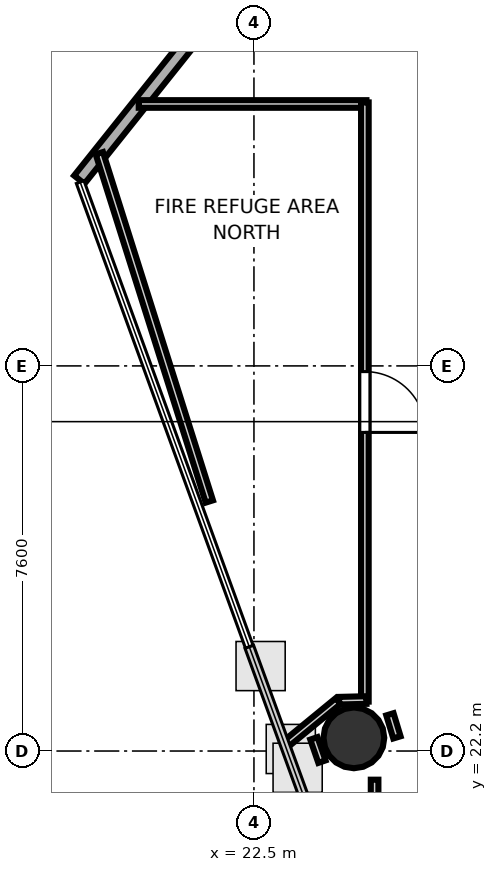
"""IFC4 building model, lengths in metres.
Left out: names, types, materials, properties, quantities, classifications, styles, units other than length and angle.
Written with IfcOpenShell. Run it as: python <this file> out.ifc"""

import sys

from ifc_helpers import new_model, si_unit, direction, frame, frame_2d, origin, origin_2d, place, context, subcontext, project, spatial, rectangle, hollow_circle, extrude, element, fill, save


model = new_model("IFC4")
c1 = context("Model", 3, precision=1e-05, world=origin(), true_north=direction((0.0, 1.0)))
c2 = subcontext(c1, "Body", "Model", "MODEL_VIEW")
j1 = project(units=[si_unit("LENGTHUNIT", "METRE"), si_unit("PLANEANGLEUNIT", "RADIAN")], contexts=[c1])
p1 = place(None, origin())
s1 = spatial("IfcSite", under=j1, at=p1, CompositionType="ELEMENT")
p2 = place(p1, origin())
s2 = spatial("IfcBuilding", under=s1, at=p2, CompositionType="ELEMENT")
p3 = place(p2, frame((0.0, 0.0, 229.9)))
s3 = spatial("IfcBuildingStorey", under=s2, at=p3, CompositionType="ELEMENT", Elevation=229.9)
p4 = place(p3, frame((24.472, 22.46, 0.0), z_axis=(0.0, 0.0, 1.0), x_axis=(1.0, 0.0, 0.0)))
e1 = element("IfcColumn", 1, at=p4, inside=s3, PredefinedType="COLUMN", context=c2, shape_type="SweptSolid", body=[
    extrude(hollow_circle(Radius=0.6, WallThickness=0.03, at=origin_2d()), origin(), (0.0, 0.0, 1.0), 4.6),
])
p5 = place(p3, frame((23.127, 38.576, 0.0), z_axis=(0.0, 0.0, 1.0), x_axis=(-0.624042741738, -0.781390207568, 0.0)))
e2 = element("IfcWall", 2, at=p5, inside=s3, PredefinedType="SOLIDWALL", context=c2, shape_type="SweptSolid", body=[
    extrude(rectangle(XDim=6.529, YDim=0.26, at=frame_2d((3.265, 0.0))), origin(), (0.0, 0.0, 1.0), 4.38),
])
p6 = place(p5, frame((1.259, 0.0, 1.0)))
e3 = element("IfcOpeningElement", 3, at=p6, cuts=e2, PredefinedType="OPENING", context=c2, shape_type="SweptSolid", body=[
    extrude(rectangle(XDim=1.4, YDim=1.5, at=frame_2d((0.7, 0.75))), frame((0.0, 0.14, 0.0), z_axis=(0.0, -1.0, 0.0), x_axis=(1.0, 0.0, 0.0)), (0.0, 0.0, 1.0), 0.28),
])
p7 = place(p3, frame((20.226, 34.969, 0.0), z_axis=(0.0, 0.0, 1.0), x_axis=(1.0, 0.0, 0.0)))
e4 = element("IfcWall", 4, at=p7, inside=s3, PredefinedType="PARTITIONING", context=c2, shape_type="SweptSolid", body=[
    extrude(rectangle(XDim=4.494, YDim=0.15, at=frame_2d((2.247, 0.0))), origin(), (0.0, 0.0, 1.0), 2.9),
])
p8 = place(p3, frame((24.689, 35.0, 0.0), z_axis=(0.0, 0.0, 1.0), x_axis=(0.0, -1.0, 0.0)))
e5 = element("IfcWall", 5, at=p8, inside=s3, PredefinedType="PARTITIONING", context=c2, shape_type="SweptSolid", body=[
    extrude(rectangle(XDim=11.825, YDim=0.15, at=frame_2d((5.913, 0.0))), origin(), (0.0, 0.0, 1.0), 2.9),
])
p9 = place(p8, frame((5.312, 0.0, 0.0)))
e6 = element("IfcOpeningElement", 6, at=p9, cuts=e5, PredefinedType="OPENING", context=c2, shape_type="SweptSolid", body=[
    extrude(rectangle(XDim=1.2, YDim=2.15, at=frame_2d((0.6, 1.075))), frame((0.0, 0.085, 0.0), z_axis=(0.0, -1.0, 0.0), x_axis=(1.0, 0.0, 0.0)), (0.0, 0.0, 1.0), 0.17),
])
p10 = place(p3, frame((24.719, 23.206, 0.0), z_axis=(0.0, 0.0, 1.0), x_axis=(-0.999711776568, -0.024007577779, 0.0)))
e7 = element("IfcWall", 7, at=p10, inside=s3, PredefinedType="PARTITIONING", context=c2, shape_type="SweptSolid", body=[
    extrude(rectangle(XDim=0.539, YDim=0.15, at=frame_2d((0.27, 0.0))), origin(), (0.0, 0.0, 1.0), 2.9),
])
p11 = place(p3, frame((24.162, 23.186, 0.0), z_axis=(0.0, 0.0, 1.0), x_axis=(-0.773104540117, -0.634278621782, 0.0)))
e8 = element("IfcWall", 8, at=p11, inside=s3, PredefinedType="PARTITIONING", context=c2, shape_type="SweptSolid", body=[
    extrude(rectangle(XDim=1.379, YDim=0.15, at=frame_2d((0.689, 0.0))), origin(), (0.0, 0.0, 1.0), 2.9),
])
p12 = place(p3, frame((23.683, 22.45, 0.0), z_axis=(0.0, 0.0, 1.0), x_axis=(0.327041651319, -0.945009924976, 0.0)))
e9 = element("IfcWall", 9, at=p12, inside=s3, PredefinedType="PARTITIONING", context=c2, shape_type="SweptSolid", body=[
    extrude(rectangle(XDim=0.487, YDim=0.15, at=frame_2d((0.243, 0.0))), origin(), (0.0, 0.0, 1.0), 2.9),
])
p13 = place(p3, frame((21.62, 27.125, 0.0), z_axis=(0.0, 0.0, 1.0), x_axis=(-0.301149199344, 0.95357703398, 0.0)))
e10 = element("IfcWall", 10, at=p13, inside=s3, PredefinedType="PARTITIONING", context=c2, shape_type="SweptSolid", body=[
    extrude(rectangle(XDim=7.208, YDim=0.15, at=frame_2d((3.604, 0.0))), origin(), (0.0, 0.0, 1.0), 2.9),
])
p14 = place(p3, frame((24.881, 17.442, 0.0), z_axis=(0.0, 0.0, 1.0), x_axis=(0.0, 1.0, 0.0)))
e11 = element("IfcWall", 11, at=p14, inside=s3, PredefinedType="PARTITIONING", context=c2, shape_type="SweptSolid", body=[
    extrude(rectangle(XDim=4.192, YDim=0.15, at=frame_2d((2.096, 0.0))), origin(), (0.0, 0.0, 1.0), 2.9),
])
p15 = place(p3, frame((25.322, 22.469, 0.0), z_axis=(0.0, 0.0, 1.0), x_axis=(-0.290263585829, 0.956946733492, 0.0)))
e12 = element("IfcWall", 12, at=p15, inside=s3, PredefinedType="PARTITIONING", context=c2, shape_type="SweptSolid", body=[
    extrude(rectangle(XDim=0.476, YDim=0.15, at=frame_2d((0.238, 0.0))), origin(), (0.0, 0.0, 1.0), 2.9),
])
p16 = place(p9, origin())
e13 = element("IfcDoor", 13, at=p16, inside=s3, OperationType="SINGLE_SWING_RIGHT", PredefinedType="DOOR", context=c2, shape_type="SweptSolid", body=[
    extrude(rectangle(XDim=1.2, YDim=2.15, at=frame_2d((0.6, 1.075))), frame((0.0, 0.025, 0.0), z_axis=(0.0, -1.0, 0.0), x_axis=(1.0, 0.0, 0.0)), (0.0, 0.0, 1.0), 0.05),
])
fill(e6, e13)
save(model, sys.argv[1])
